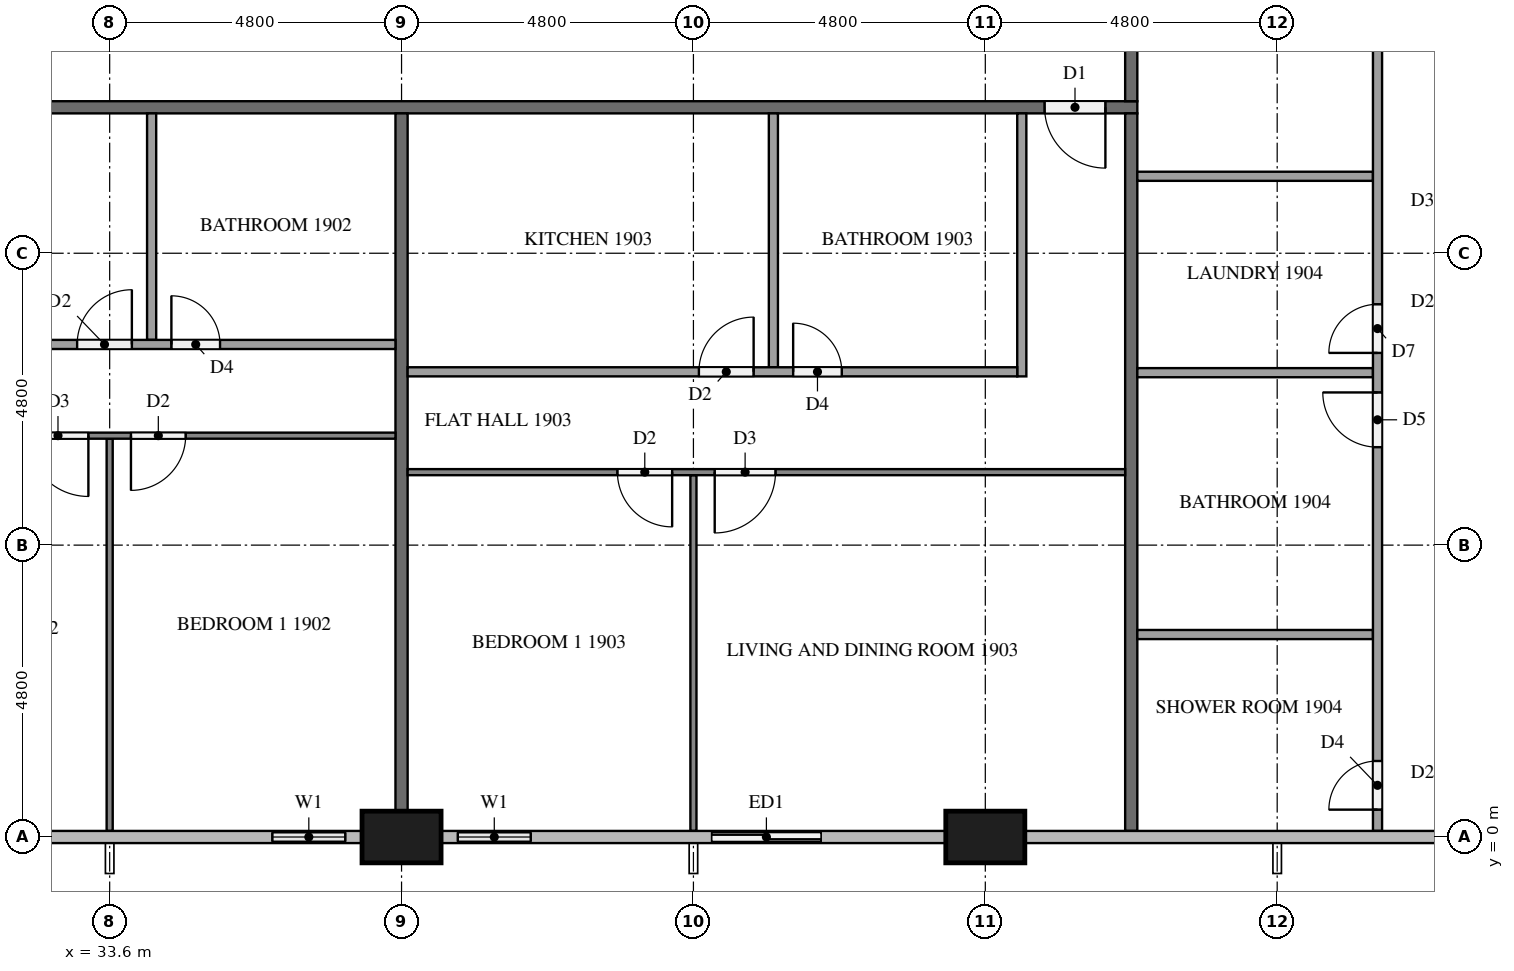
"""IFC4 building model, lengths in metres.
Left out: names, types, materials, properties, quantities, classifications, styles, units other than length and angle.
Written with IfcOpenShell. Run it as: python <this file> out.ifc"""

import sys

from ifc_helpers import new_model, si_unit, direction, frame, frame_2d, origin, origin_2d, place, context, subcontext, project, spatial, rectangle, extrude, element, fill, save


model = new_model("IFC4")
c1 = context("Model", 3, precision=1e-05, world=origin(), true_north=direction((0.0, 1.0)))
c2 = subcontext(c1, "Body", "Model", "MODEL_VIEW")
j1 = project(units=[si_unit("LENGTHUNIT", "METRE"), si_unit("PLANEANGLEUNIT", "RADIAN")], contexts=[c1])
p1 = place(None, origin())
s1 = spatial("IfcSite", under=j1, at=p1, CompositionType="ELEMENT")
p2 = place(p1, origin())
s2 = spatial("IfcBuilding", under=s1, at=p2, CompositionType="ELEMENT")
p3 = place(p2, frame((0.0, 0.0, 76.8)))
s3 = spatial("IfcBuildingStorey", under=s2, at=p3, CompositionType="ELEMENT", Elevation=76.8)
for number, where, z_axis, x_axis in (
    (1, (38.4, 0.0, 0.0), (0.0, 0.0, 1.0), (1.0, 0.0, 0.0)),
    (2, (48.0, 0.0, 0.0), (0.0, 0.0, 1.0), (1.0, 0.0, 0.0)),
):
    element("IfcColumn", number, at=place(p3, frame(where, z_axis=z_axis, x_axis=x_axis)), inside=s3, PredefinedType="COLUMN", context=c2, shape_type="SweptSolid", body=[
        extrude(rectangle(XDim=1.3, YDim=0.85, at=origin_2d()), origin(), (0.0, 0.0, 1.0), 3.2),
    ])
p4 = place(p3, frame((36.0, 0.0, 0.0), z_axis=(0.0, 0.0, 1.0), x_axis=(1.0, 0.0, 0.0)))
e3 = element("IfcWall", 3, at=p4, inside=s3, PredefinedType="SOLIDWALL", context=c2, shape_type="SweptSolid", body=[
    extrude(rectangle(XDim=1.75, YDim=0.15, at=frame_2d((0.875, 0.0))), origin(), (0.0, 0.0, 1.0), 3.2),
])
p5 = place(p4, frame((0.275, 0.0, 0.9)))
e4 = element("IfcOpeningElement", 4, at=p5, cuts=e3, PredefinedType="OPENING", context=c2, shape_type="SweptSolid", body=[
    extrude(rectangle(XDim=1.2, YDim=1.4, at=frame_2d((0.6, 0.7))), frame((0.0, 0.085, 0.0), z_axis=(0.0, -1.0, 0.0), x_axis=(1.0, 0.0, 0.0)), (0.0, 0.0, 1.0), 0.17),
])
p6 = place(p3, frame((39.05, 0.0, 0.0), z_axis=(0.0, 0.0, 1.0), x_axis=(1.0, 0.0, 0.0)))
e5 = element("IfcWall", 5, at=p6, inside=s3, PredefinedType="SOLIDWALL", context=c2, shape_type="SweptSolid", body=[
    extrude(rectangle(XDim=1.75, YDim=0.15, at=frame_2d((0.875, 0.0))), origin(), (0.0, 0.0, 1.0), 3.2),
])
p7 = place(p6, frame((0.275, 0.0, 0.9)))
e6 = element("IfcOpeningElement", 6, at=p7, cuts=e5, PredefinedType="OPENING", context=c2, shape_type="SweptSolid", body=[
    extrude(rectangle(XDim=1.2, YDim=1.4, at=frame_2d((0.6, 0.7))), frame((0.0, 0.085, 0.0), z_axis=(0.0, -1.0, 0.0), x_axis=(1.0, 0.0, 0.0)), (0.0, 0.0, 1.0), 0.17),
])
p8 = place(p3, frame((43.2, 0.0, 0.0), z_axis=(0.0, 0.0, 1.0), x_axis=(1.0, 0.0, 0.0)))
e7 = element("IfcWall", 7, at=p8, inside=s3, PredefinedType="SOLIDWALL", context=c2, shape_type="SweptSolid", body=[
    extrude(rectangle(XDim=2.4, YDim=0.15, at=frame_2d((1.2, 0.0))), origin(), (0.0, 0.0, 1.0), 3.2),
])
p9 = place(p8, frame((0.3, 0.0, 0.0)))
e8 = element("IfcOpeningElement", 8, at=p9, cuts=e7, PredefinedType="OPENING", context=c2, shape_type="SweptSolid", body=[
    extrude(rectangle(XDim=1.8, YDim=2.4, at=frame_2d((0.9, 1.2))), frame((0.0, 0.085, 0.0), z_axis=(0.0, -1.0, 0.0), x_axis=(1.0, 0.0, 0.0)), (0.0, 0.0, 1.0), 0.17),
])
p10 = place(p3, frame((50.5, 12.0, 0.0), z_axis=(0.0, 0.0, 1.0), x_axis=(-1.0, 0.0, 0.0)))
e9 = element("IfcWall", 9, at=p10, inside=s3, PredefinedType="PARTITIONING", context=c2, shape_type="SweptSolid", body=[
    extrude(rectangle(XDim=38.6, YDim=0.2, at=frame_2d((19.3, 0.0))), origin(), (0.0, 0.0, 1.0), 3.2),
])
p11 = place(p10, frame((37.075, 0.0, 0.0)))
e10 = element("IfcOpeningElement", 10, at=p11, cuts=e9, PredefinedType="OPENING", context=c2, shape_type="SweptSolid", body=[
    extrude(rectangle(XDim=1.0, YDim=2.1, at=frame_2d((0.5, 1.05))), frame((0.0, 0.11, 0.0), z_axis=(0.0, -1.0, 0.0), x_axis=(1.0, 0.0, 0.0)), (0.0, 0.0, 1.0), 0.22),
])
p12 = place(p10, frame((22.675, 0.0, 0.0)))
e11 = element("IfcOpeningElement", 11, at=p12, cuts=e9, PredefinedType="OPENING", context=c2, shape_type="SweptSolid", body=[
    extrude(rectangle(XDim=1.0, YDim=2.1, at=frame_2d((0.5, 1.05))), frame((0.0, 0.11, 0.0), z_axis=(0.0, -1.0, 0.0), x_axis=(1.0, 0.0, 0.0)), (0.0, 0.0, 1.0), 0.22),
])
p13 = place(p10, frame((0.525, 0.0, 0.0)))
e12 = element("IfcOpeningElement", 12, at=p13, cuts=e9, PredefinedType="OPENING", context=c2, shape_type="SweptSolid", body=[
    extrude(rectangle(XDim=1.0, YDim=2.1, at=frame_2d((0.5, 1.05))), frame((0.0, 0.11, 0.0), z_axis=(0.0, -1.0, 0.0), x_axis=(1.0, 0.0, 0.0)), (0.0, 0.0, 1.0), 0.22),
])
p14 = place(p3, frame((50.4, 40.7, 0.0), z_axis=(0.0, 0.0, 1.0), x_axis=(0.0, -1.0, 0.0)))
e13 = element("IfcWall", 13, at=p14, inside=s3, PredefinedType="PARTITIONING", context=c2, shape_type="SweptSolid", body=[
    extrude(rectangle(XDim=28.6, YDim=0.2, at=frame_2d((14.3, 0.0))), origin(), (0.0, 0.0, 1.0), 3.2),
])
p15 = place(p14, frame((21.875, 0.0, 0.0)))
e14 = element("IfcOpeningElement", 14, at=p15, cuts=e13, PredefinedType="OPENING", context=c2, shape_type="SweptSolid", body=[
    extrude(rectangle(XDim=1.1, YDim=2.1, at=frame_2d((0.55, 1.05))), frame((0.0, 0.11, 0.0), z_axis=(0.0, -1.0, 0.0), x_axis=(1.0, 0.0, 0.0)), (0.0, 0.0, 1.0), 0.22),
])
p16 = place(p14, frame((20.075, 0.0, 0.0)))
e15 = element("IfcOpeningElement", 15, at=p16, cuts=e13, PredefinedType="OPENING", context=c2, shape_type="SweptSolid", body=[
    extrude(rectangle(XDim=1.0, YDim=2.1, at=frame_2d((0.5, 1.05))), frame((0.0, 0.11, 0.0), z_axis=(0.0, -1.0, 0.0), x_axis=(1.0, 0.0, 0.0)), (0.0, 0.0, 1.0), 0.22),
])
p17 = place(p14, frame((5.675, 0.0, 0.0)))
e16 = element("IfcOpeningElement", 16, at=p17, cuts=e13, PredefinedType="OPENING", context=c2, shape_type="SweptSolid", body=[
    extrude(rectangle(XDim=1.0, YDim=2.1, at=frame_2d((0.5, 1.05))), frame((0.0, 0.11, 0.0), z_axis=(0.0, -1.0, 0.0), x_axis=(1.0, 0.0, 0.0)), (0.0, 0.0, 1.0), 0.22),
])
p18 = place(p3, frame((38.4, 11.9, 0.0), z_axis=(0.0, 0.0, 1.0), x_axis=(0.0, -1.0, 0.0)))
e17 = element("IfcWall", 17, at=p18, inside=s3, PredefinedType="PARTITIONING", context=c2, shape_type="SweptSolid", body=[
    extrude(rectangle(XDim=11.475, YDim=0.2, at=frame_2d((5.737, 0.0))), origin(), (0.0, 0.0, 1.0), 3.2),
])
p19 = place(p3, frame((50.4, 11.9, 0.0), z_axis=(0.0, 0.0, 1.0), x_axis=(0.0, -1.0, 0.0)))
e18 = element("IfcWall", 18, at=p19, inside=s3, PredefinedType="PARTITIONING", context=c2, shape_type="SweptSolid", body=[
    extrude(rectangle(XDim=11.8, YDim=0.2, at=frame_2d((5.9, 0.0))), origin(), (0.0, 0.0, 1.0), 3.2),
])
p20 = place(p3, frame((33.6, 6.55, 0.0), z_axis=(0.0, 0.0, 1.0), x_axis=(0.0, -1.0, 0.0)))
e19 = element("IfcWall", 19, at=p20, inside=s3, PredefinedType="PARTITIONING", context=c2, shape_type="SweptSolid", body=[
    extrude(rectangle(XDim=6.45, YDim=0.1, at=frame_2d((3.225, 0.0))), origin(), (0.0, 0.0, 1.0), 3.2),
])
p21 = place(p3, frame((38.3, 6.6, 0.0), z_axis=(0.0, 0.0, 1.0), x_axis=(-1.0, 0.0, 0.0)))
e20 = element("IfcWall", 20, at=p21, inside=s3, PredefinedType="PARTITIONING", context=c2, shape_type="SweptSolid", body=[
    extrude(rectangle(XDim=11.8, YDim=0.1, at=frame_2d((5.9, 0.0))), origin(), (0.0, 0.0, 1.0), 3.2),
])
p22 = place(p21, frame((5.05, 0.0, 0.0)))
e21 = element("IfcOpeningElement", 21, at=p22, cuts=e20, PredefinedType="OPENING", context=c2, shape_type="SweptSolid", body=[
    extrude(rectangle(XDim=1.0, YDim=2.1, at=frame_2d((0.5, 1.05))), frame((0.0, 0.06, 0.0), z_axis=(0.0, -1.0, 0.0), x_axis=(1.0, 0.0, 0.0)), (0.0, 0.0, 1.0), 0.12),
])
p23 = place(p21, frame((3.45, 0.0, 0.0)))
e22 = element("IfcOpeningElement", 22, at=p23, cuts=e20, PredefinedType="OPENING", context=c2, shape_type="SweptSolid", body=[
    extrude(rectangle(XDim=0.9, YDim=2.1, at=frame_2d((0.45, 1.05))), frame((0.0, 0.06, 0.0), z_axis=(0.0, -1.0, 0.0), x_axis=(1.0, 0.0, 0.0)), (0.0, 0.0, 1.0), 0.12),
])
p24 = place(p3, frame((34.29, 11.9, 0.0), z_axis=(0.0, 0.0, 1.0), x_axis=(0.0, -1.0, 0.0)))
e23 = element("IfcWall", 23, at=p24, inside=s3, PredefinedType="PARTITIONING", context=c2, shape_type="SweptSolid", body=[
    extrude(rectangle(XDim=3.725, YDim=0.15, at=frame_2d((1.862, 0.0))), origin(), (0.0, 0.0, 1.0), 3.2),
])
p25 = place(p3, frame((28.275, 8.1, 0.0), z_axis=(0.0, 0.0, 1.0), x_axis=(1.0, 0.0, 0.0)))
e24 = element("IfcWall", 24, at=p25, inside=s3, PredefinedType="PARTITIONING", context=c2, shape_type="SweptSolid", body=[
    extrude(rectangle(XDim=10.025, YDim=0.15, at=frame_2d((5.013, 0.0))), origin(), (0.0, 0.0, 1.0), 3.2),
])
p26 = place(p25, frame((4.79, 0.0, 0.0)))
e25 = element("IfcOpeningElement", 25, at=p26, cuts=e24, PredefinedType="OPENING", context=c2, shape_type="SweptSolid", body=[
    extrude(rectangle(XDim=0.9, YDim=2.1, at=frame_2d((0.45, 1.05))), frame((0.0, 0.085, 0.0), z_axis=(0.0, -1.0, 0.0), x_axis=(1.0, 0.0, 0.0)), (0.0, 0.0, 1.0), 0.17),
])
p27 = place(p25, frame((6.34, 0.0, 0.0)))
e26 = element("IfcOpeningElement", 26, at=p27, cuts=e24, PredefinedType="OPENING", context=c2, shape_type="SweptSolid", body=[
    extrude(rectangle(XDim=0.8, YDim=2.1, at=frame_2d((0.4, 1.05))), frame((0.0, 0.085, 0.0), z_axis=(0.0, -1.0, 0.0), x_axis=(1.0, 0.0, 0.0)), (0.0, 0.0, 1.0), 0.17),
])
p28 = place(p3, frame((43.2, 5.95, 0.0), z_axis=(0.0, 0.0, 1.0), x_axis=(0.0, -1.0, 0.0)))
e27 = element("IfcWall", 27, at=p28, inside=s3, PredefinedType="PARTITIONING", context=c2, shape_type="SweptSolid", body=[
    extrude(rectangle(XDim=5.85, YDim=0.1, at=frame_2d((2.925, 0.0))), origin(), (0.0, 0.0, 1.0), 3.2),
])
p29 = place(p3, frame((50.3, 6.0, 0.0), z_axis=(0.0, 0.0, 1.0), x_axis=(-1.0, 0.0, 0.0)))
e28 = element("IfcWall", 28, at=p29, inside=s3, PredefinedType="PARTITIONING", context=c2, shape_type="SweptSolid", body=[
    extrude(rectangle(XDim=11.8, YDim=0.1, at=frame_2d((5.9, 0.0))), origin(), (0.0, 0.0, 1.0), 3.2),
])
p30 = place(p29, frame((5.75, 0.0, 0.0)))
e29 = element("IfcOpeningElement", 29, at=p30, cuts=e28, PredefinedType="OPENING", context=c2, shape_type="SweptSolid", body=[
    extrude(rectangle(XDim=1.0, YDim=2.1, at=frame_2d((0.5, 1.05))), frame((0.0, 0.06, 0.0), z_axis=(0.0, -1.0, 0.0), x_axis=(1.0, 0.0, 0.0)), (0.0, 0.0, 1.0), 0.12),
])
p31 = place(p29, frame((7.45, 0.0, 0.0)))
e30 = element("IfcOpeningElement", 30, at=p31, cuts=e28, PredefinedType="OPENING", context=c2, shape_type="SweptSolid", body=[
    extrude(rectangle(XDim=0.9, YDim=2.1, at=frame_2d((0.45, 1.05))), frame((0.0, 0.06, 0.0), z_axis=(0.0, -1.0, 0.0), x_axis=(1.0, 0.0, 0.0)), (0.0, 0.0, 1.0), 0.12),
])
p32 = place(p3, frame((44.515, 11.9, 0.0), z_axis=(0.0, 0.0, 1.0), x_axis=(0.0, -1.0, 0.0)))
e31 = element("IfcWall", 31, at=p32, inside=s3, PredefinedType="PARTITIONING", context=c2, shape_type="SweptSolid", body=[
    extrude(rectangle(XDim=4.175, YDim=0.15, at=frame_2d((2.087, 0.0))), origin(), (0.0, 0.0, 1.0), 3.2),
])
p33 = place(p3, frame((48.6, 11.9, 0.0), z_axis=(0.0, 0.0, 1.0), x_axis=(0.0, -1.0, 0.0)))
e32 = element("IfcWall", 32, at=p33, inside=s3, PredefinedType="PARTITIONING", context=c2, shape_type="SweptSolid", body=[
    extrude(rectangle(XDim=4.325, YDim=0.15, at=frame_2d((2.163, 0.0))), origin(), (0.0, 0.0, 1.0), 3.2),
])
p34 = place(p3, frame((38.5, 7.65, 0.0), z_axis=(0.0, 0.0, 1.0), x_axis=(1.0, 0.0, 0.0)))
e33 = element("IfcWall", 33, at=p34, inside=s3, PredefinedType="PARTITIONING", context=c2, shape_type="SweptSolid", body=[
    extrude(rectangle(XDim=10.025, YDim=0.15, at=frame_2d((5.012, 0.0))), origin(), (0.0, 0.0, 1.0), 3.2),
])
p35 = place(p34, frame((6.34, 0.0, 0.0)))
e34 = element("IfcOpeningElement", 34, at=p35, cuts=e33, PredefinedType="OPENING", context=c2, shape_type="SweptSolid", body=[
    extrude(rectangle(XDim=0.8, YDim=2.1, at=frame_2d((0.4, 1.05))), frame((0.0, 0.085, 0.0), z_axis=(0.0, -1.0, 0.0), x_axis=(1.0, 0.0, 0.0)), (0.0, 0.0, 1.0), 0.17),
])
p36 = place(p34, frame((4.79, 0.0, 0.0)))
e35 = element("IfcOpeningElement", 35, at=p36, cuts=e33, PredefinedType="OPENING", context=c2, shape_type="SweptSolid", body=[
    extrude(rectangle(XDim=0.9, YDim=2.1, at=frame_2d((0.45, 1.05))), frame((0.0, 0.085, 0.0), z_axis=(0.0, -1.0, 0.0), x_axis=(1.0, 0.0, 0.0)), (0.0, 0.0, 1.0), 0.17),
])
for number, where, z_axis, x_axis in (
    (36, (50.5, 10.865, 0.0), (0.0, 0.0, 1.0), (1.0, 0.0, 0.0)),
    (37, (50.5, 7.636, 0.0), (0.0, 0.0, 1.0), (1.0, 0.0, 0.0)),
    (38, (50.5, 3.33, 0.0), (0.0, 0.0, 1.0), (1.0, 0.0, 0.0)),
):
    element("IfcWall", number, at=place(p3, frame(where, z_axis=z_axis, x_axis=x_axis)), inside=s3, PredefinedType="PARTITIONING", context=c2, shape_type="SweptSolid", body=[
        extrude(rectangle(XDim=3.875, YDim=0.15, at=frame_2d((1.938, 0.0))), origin(), (0.0, 0.0, 1.0), 3.2),
    ])
p37 = place(p3, frame((54.45, 0.1, 0.0), z_axis=(0.0, 0.0, 1.0), x_axis=(0.0, 1.0, 0.0)))
e39 = element("IfcWall", 39, at=p37, inside=s3, PredefinedType="PARTITIONING", context=c2, shape_type="SweptSolid", body=[
    extrude(rectangle(XDim=17.225, YDim=0.15, at=frame_2d((8.612, 0.0))), origin(), (0.0, 0.0, 1.0), 3.2),
])
p38 = place(p37, frame((16.025, 0.0, 0.0)))
e40 = element("IfcOpeningElement", 40, at=p38, cuts=e39, PredefinedType="OPENING", context=c2, shape_type="SweptSolid", body=[
    extrude(rectangle(XDim=0.9, YDim=2.1, at=frame_2d((0.45, 1.05))), frame((0.0, 0.085, 0.0), z_axis=(0.0, -1.0, 0.0), x_axis=(1.0, 0.0, 0.0)), (0.0, 0.0, 1.0), 0.17),
])
p39 = place(p37, frame((7.861, 0.0, 0.0)))
e41 = element("IfcOpeningElement", 41, at=p39, cuts=e39, PredefinedType="OPENING", context=c2, shape_type="SweptSolid", body=[
    extrude(rectangle(XDim=0.8, YDim=2.1, at=frame_2d((0.4, 1.05))), frame((0.0, 0.085, 0.0), z_axis=(0.0, -1.0, 0.0), x_axis=(1.0, 0.0, 0.0)), (0.0, 0.0, 1.0), 0.17),
])
p40 = place(p37, frame((6.311, 0.0, 0.0)))
e42 = element("IfcOpeningElement", 42, at=p40, cuts=e39, PredefinedType="OPENING", context=c2, shape_type="SweptSolid", body=[
    extrude(rectangle(XDim=0.9, YDim=2.1, at=frame_2d((0.45, 1.05))), frame((0.0, 0.085, 0.0), z_axis=(0.0, -1.0, 0.0), x_axis=(1.0, 0.0, 0.0)), (0.0, 0.0, 1.0), 0.17),
])
p41 = place(p37, frame((0.35, 0.0, 0.0)))
e43 = element("IfcOpeningElement", 43, at=p41, cuts=e39, PredefinedType="OPENING", context=c2, shape_type="SweptSolid", body=[
    extrude(rectangle(XDim=0.8, YDim=2.1, at=frame_2d((0.4, 1.05))), frame((0.0, 0.085, 0.0), z_axis=(0.0, -1.0, 0.0), x_axis=(1.0, 0.0, 0.0)), (0.0, 0.0, 1.0), 0.17),
])
p42 = place(p5, origin())
e44 = element("IfcWindow", 44, at=p42, inside=s3, PartitioningType="SINGLE_PANEL", PredefinedType="WINDOW", context=c2, shape_type="SweptSolid", body=[
    extrude(rectangle(XDim=1.2, YDim=1.4, at=frame_2d((0.6, 0.7))), frame((0.0, 0.03, 0.0), z_axis=(0.0, -1.0, 0.0), x_axis=(1.0, 0.0, 0.0)), (0.0, 0.0, 1.0), 0.06),
])
fill(e4, e44)
p43 = place(p7, origin())
e45 = element("IfcWindow", 45, at=p43, inside=s3, PartitioningType="SINGLE_PANEL", PredefinedType="WINDOW", context=c2, shape_type="SweptSolid", body=[
    extrude(rectangle(XDim=1.2, YDim=1.4, at=frame_2d((0.6, 0.7))), frame((0.0, 0.03, 0.0), z_axis=(0.0, -1.0, 0.0), x_axis=(1.0, 0.0, 0.0)), (0.0, 0.0, 1.0), 0.06),
])
fill(e6, e45)
p44 = place(p9, origin())
e46 = element("IfcDoor", 46, at=p44, inside=s3, OperationType="SLIDING_TO_RIGHT", PredefinedType="DOOR", context=c2, shape_type="SweptSolid", body=[
    extrude(rectangle(XDim=1.8, YDim=2.4, at=frame_2d((0.9, 1.2))), frame((0.0, 0.025, 0.0), z_axis=(0.0, -1.0, 0.0), x_axis=(1.0, 0.0, 0.0)), (0.0, 0.0, 1.0), 0.05),
])
fill(e8, e46)
p45 = place(p13, origin())
e47 = element("IfcDoor", 47, at=p45, inside=s3, OperationType="SINGLE_SWING_LEFT", PredefinedType="DOOR", context=c2, shape_type="SweptSolid", body=[
    extrude(rectangle(XDim=1.0, YDim=2.1, at=frame_2d((0.5, 1.05))), frame((0.0, 0.025, 0.0), z_axis=(0.0, -1.0, 0.0), x_axis=(1.0, 0.0, 0.0)), (0.0, 0.0, 1.0), 0.05),
])
fill(e12, e47)
p46 = place(p22, origin())
e48 = element("IfcDoor", 48, at=p46, inside=s3, OperationType="SINGLE_SWING_LEFT", PredefinedType="DOOR", context=c2, shape_type="SweptSolid", body=[
    extrude(rectangle(XDim=1.0, YDim=2.1, at=frame_2d((0.5, 1.05))), frame((0.0, 0.025, 0.0), z_axis=(0.0, -1.0, 0.0), x_axis=(1.0, 0.0, 0.0)), (0.0, 0.0, 1.0), 0.05),
])
fill(e21, e48)
p47 = place(p23, origin())
e49 = element("IfcDoor", 49, at=p47, inside=s3, OperationType="SINGLE_SWING_RIGHT", PredefinedType="DOOR", context=c2, shape_type="SweptSolid", body=[
    extrude(rectangle(XDim=0.9, YDim=2.1, at=frame_2d((0.45, 1.05))), frame((0.0, 0.025, 0.0), z_axis=(0.0, -1.0, 0.0), x_axis=(1.0, 0.0, 0.0)), (0.0, 0.0, 1.0), 0.05),
])
fill(e22, e49)
p48 = place(p26, origin())
e50 = element("IfcDoor", 50, at=p48, inside=s3, OperationType="SINGLE_SWING_RIGHT", PredefinedType="DOOR", context=c2, shape_type="SweptSolid", body=[
    extrude(rectangle(XDim=0.9, YDim=2.1, at=frame_2d((0.45, 1.05))), frame((0.0, 0.025, 0.0), z_axis=(0.0, -1.0, 0.0), x_axis=(1.0, 0.0, 0.0)), (0.0, 0.0, 1.0), 0.05),
])
fill(e25, e50)
p49 = place(p27, origin())
e51 = element("IfcDoor", 51, at=p49, inside=s3, OperationType="SINGLE_SWING_LEFT", PredefinedType="DOOR", context=c2, shape_type="SweptSolid", body=[
    extrude(rectangle(XDim=0.8, YDim=2.1, at=frame_2d((0.4, 1.05))), frame((0.0, 0.025, 0.0), z_axis=(0.0, -1.0, 0.0), x_axis=(1.0, 0.0, 0.0)), (0.0, 0.0, 1.0), 0.05),
])
fill(e26, e51)
p50 = place(p30, origin())
e52 = element("IfcDoor", 52, at=p50, inside=s3, OperationType="SINGLE_SWING_RIGHT", PredefinedType="DOOR", context=c2, shape_type="SweptSolid", body=[
    extrude(rectangle(XDim=1.0, YDim=2.1, at=frame_2d((0.5, 1.05))), frame((0.0, 0.025, 0.0), z_axis=(0.0, -1.0, 0.0), x_axis=(1.0, 0.0, 0.0)), (0.0, 0.0, 1.0), 0.05),
])
fill(e29, e52)
p51 = place(p31, origin())
e53 = element("IfcDoor", 53, at=p51, inside=s3, OperationType="SINGLE_SWING_LEFT", PredefinedType="DOOR", context=c2, shape_type="SweptSolid", body=[
    extrude(rectangle(XDim=0.9, YDim=2.1, at=frame_2d((0.45, 1.05))), frame((0.0, 0.025, 0.0), z_axis=(0.0, -1.0, 0.0), x_axis=(1.0, 0.0, 0.0)), (0.0, 0.0, 1.0), 0.05),
])
fill(e30, e53)
p52 = place(p35, origin())
e54 = element("IfcDoor", 54, at=p52, inside=s3, OperationType="SINGLE_SWING_LEFT", PredefinedType="DOOR", context=c2, shape_type="SweptSolid", body=[
    extrude(rectangle(XDim=0.8, YDim=2.1, at=frame_2d((0.4, 1.05))), frame((0.0, 0.025, 0.0), z_axis=(0.0, -1.0, 0.0), x_axis=(1.0, 0.0, 0.0)), (0.0, 0.0, 1.0), 0.05),
])
fill(e34, e54)
p53 = place(p36, origin())
e55 = element("IfcDoor", 55, at=p53, inside=s3, OperationType="SINGLE_SWING_RIGHT", PredefinedType="DOOR", context=c2, shape_type="SweptSolid", body=[
    extrude(rectangle(XDim=0.9, YDim=2.1, at=frame_2d((0.45, 1.05))), frame((0.0, 0.025, 0.0), z_axis=(0.0, -1.0, 0.0), x_axis=(1.0, 0.0, 0.0)), (0.0, 0.0, 1.0), 0.05),
])
fill(e35, e55)
p54 = place(p39, origin())
e56 = element("IfcDoor", 56, at=p54, inside=s3, OperationType="SINGLE_SWING_LEFT", PredefinedType="DOOR", context=c2, shape_type="SweptSolid", body=[
    extrude(rectangle(XDim=0.8, YDim=2.1, at=frame_2d((0.4, 1.05))), frame((0.0, 0.025, 0.0), z_axis=(0.0, -1.0, 0.0), x_axis=(1.0, 0.0, 0.0)), (0.0, 0.0, 1.0), 0.05),
])
fill(e41, e56)
p55 = place(p40, origin())
e57 = element("IfcDoor", 57, at=p55, inside=s3, OperationType="SINGLE_SWING_RIGHT", PredefinedType="DOOR", context=c2, shape_type="SweptSolid", body=[
    extrude(rectangle(XDim=0.9, YDim=2.1, at=frame_2d((0.45, 1.05))), frame((0.0, 0.025, 0.0), z_axis=(0.0, -1.0, 0.0), x_axis=(1.0, 0.0, 0.0)), (0.0, 0.0, 1.0), 0.05),
])
fill(e42, e57)
p56 = place(p41, origin())
e58 = element("IfcDoor", 58, at=p56, inside=s3, OperationType="SINGLE_SWING_LEFT", PredefinedType="DOOR", context=c2, shape_type="SweptSolid", body=[
    extrude(rectangle(XDim=0.8, YDim=2.1, at=frame_2d((0.4, 1.05))), frame((0.0, 0.025, 0.0), z_axis=(0.0, -1.0, 0.0), x_axis=(1.0, 0.0, 0.0)), (0.0, 0.0, 1.0), 0.05),
])
fill(e43, e58)
save(model, sys.argv[1])
